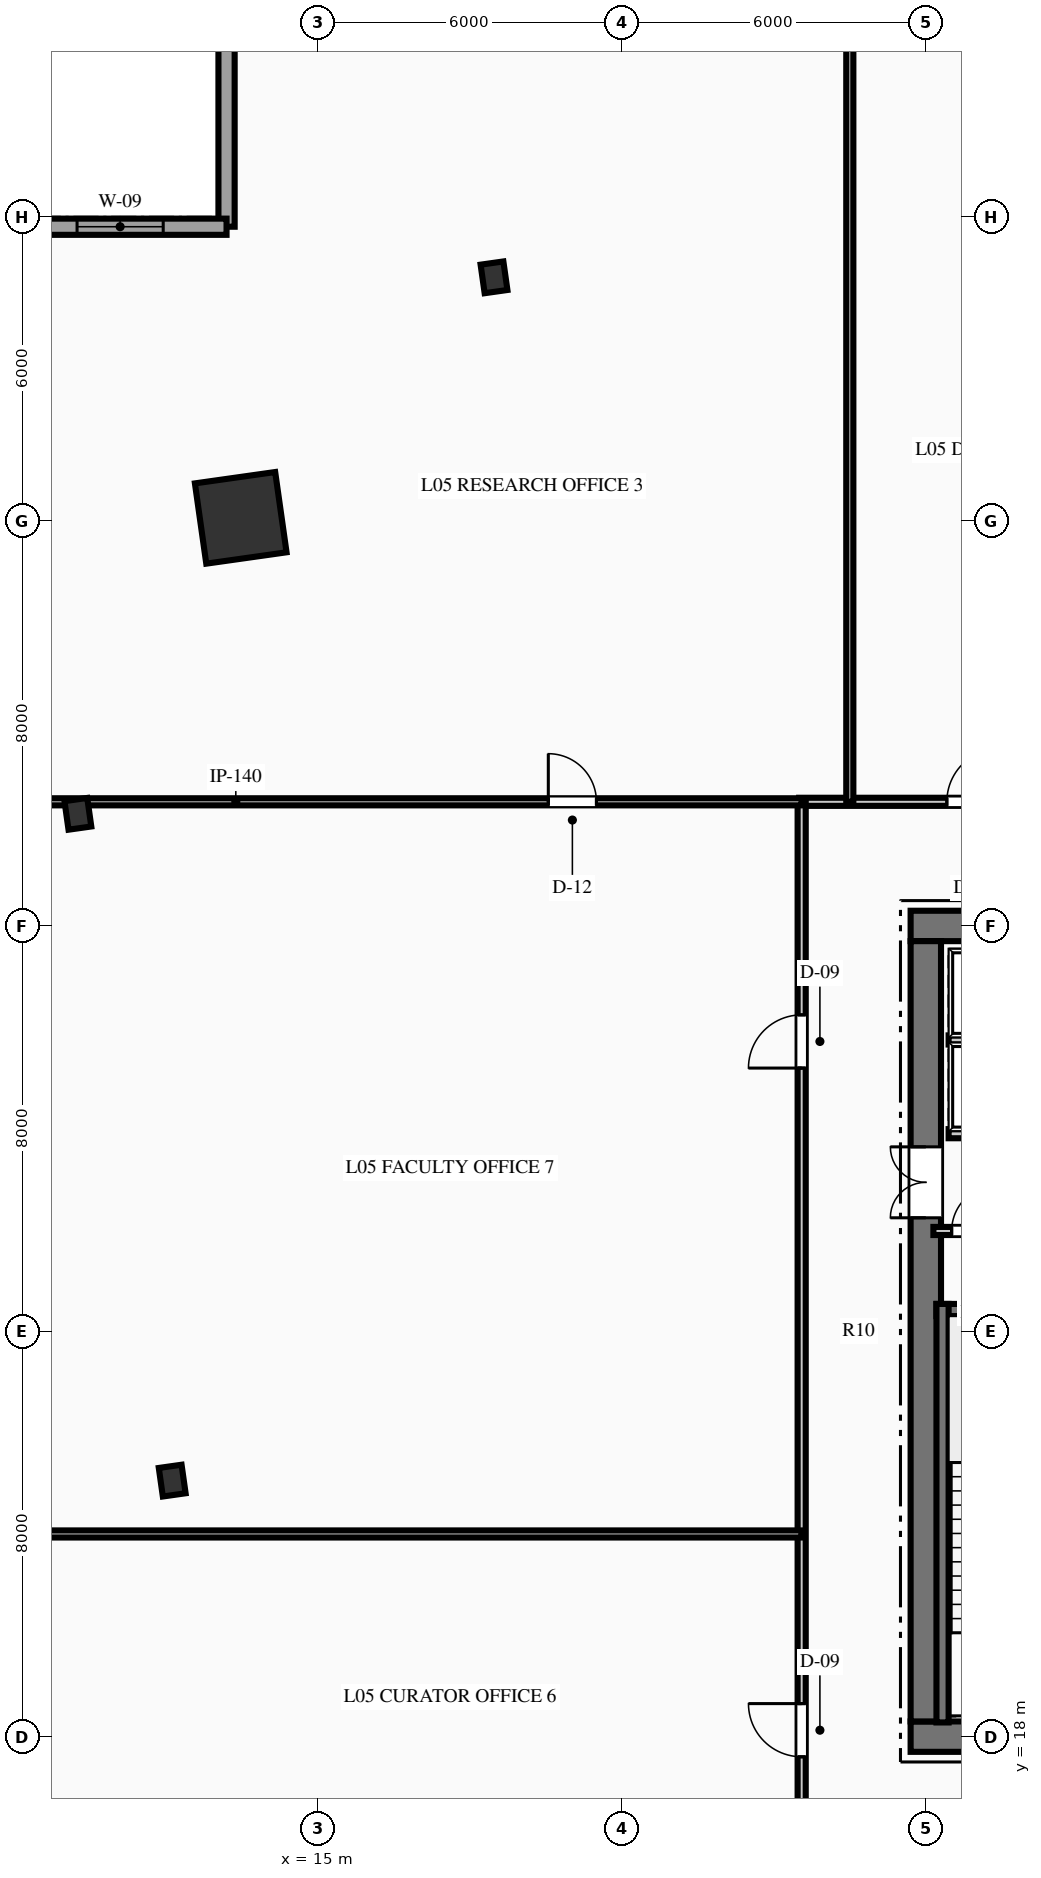
"""IFC4 building model, lengths in metres.
Left out: names, types, materials, properties, quantities, classifications, styles, units other than length and angle.
Written with IfcOpenShell. Run it as: python <this file> out.ifc"""

import sys

from ifc_helpers import new_model, si_unit, direction, frame, frame_2d, origin, origin_2d, place, context, subcontext, project, spatial, rectangle, hollow_rectangle, i_section, extrude, element, fill, save


model = new_model("IFC4")
c1 = context("Model", 3, precision=1e-05, world=origin(), true_north=direction((0.0, 1.0)))
c2 = subcontext(c1, "Body", "Model", "MODEL_VIEW")
j1 = project(units=[si_unit("LENGTHUNIT", "METRE"), si_unit("PLANEANGLEUNIT", "RADIAN")], contexts=[c1])
p1 = place(None, origin())
s1 = spatial("IfcSite", under=j1, at=p1, CompositionType="ELEMENT")
p2 = place(p1, origin())
s2 = spatial("IfcBuilding", under=s1, at=p2, CompositionType="ELEMENT")
p3 = place(p2, frame((0.0, 0.0, 28.2)))
s3 = spatial("IfcBuildingStorey", under=s2, at=p3, CompositionType="ELEMENT", Elevation=28.2)
p4 = place(p3, frame((26.7, 18.0, 0.0), z_axis=(0.0, 0.0, 1.0), x_axis=(1.0, 0.0, 0.0)))
e1 = element("IfcWall", 1, at=p4, inside=s3, PredefinedType="SHEAR", context=c2, shape_type="SweptSolid", body=[
    extrude(rectangle(XDim=18.6, YDim=0.6, at=frame_2d((9.3, 0.0))), origin(), (0.0, 0.0, 1.0), 4.5),
])
p5 = place(p4, frame((7.4, 0.0, 0.0)))
e2 = element("IfcOpeningElement", 2, at=p5, cuts=e1, PredefinedType="OPENING", context=c2, shape_type="SweptSolid", body=[
    extrude(rectangle(XDim=1.1, YDim=2.15, at=frame_2d((0.55, 1.075))), frame((0.0, 0.31, 0.0), z_axis=(0.0, -1.0, 0.0), x_axis=(1.0, 0.0, 0.0)), (0.0, 0.0, 1.0), 0.62),
])
p6 = place(p4, frame((10.1, 0.0, 0.0)))
e3 = element("IfcOpeningElement", 3, at=p6, cuts=e1, PredefinedType="OPENING", context=c2, shape_type="SweptSolid", body=[
    extrude(rectangle(XDim=1.1, YDim=2.15, at=frame_2d((0.55, 1.075))), frame((0.0, 0.31, 0.0), z_axis=(0.0, -1.0, 0.0), x_axis=(1.0, 0.0, 0.0)), (0.0, 0.0, 1.0), 0.62),
])
p7 = place(p3, frame((26.7, 34.0, 0.0), z_axis=(0.0, 0.0, 1.0), x_axis=(1.0, 0.0, 0.0)))
e4 = element("IfcWall", 4, at=p7, inside=s3, PredefinedType="SHEAR", context=c2, shape_type="SweptSolid", body=[
    extrude(rectangle(XDim=18.6, YDim=0.6, at=frame_2d((9.3, 0.0))), origin(), (0.0, 0.0, 1.0), 4.5),
])
p8 = place(p7, frame((1.265, 0.0, 0.0)))
e5 = element("IfcOpeningElement", 5, at=p8, cuts=e4, PredefinedType="OPENING", context=c2, shape_type="SweptSolid", body=[
    extrude(rectangle(XDim=1.1, YDim=2.15, at=frame_2d((0.55, 1.075))), frame((0.0, 0.31, 0.0), z_axis=(0.0, -1.0, 0.0), x_axis=(1.0, 0.0, 0.0)), (0.0, 0.0, 1.0), 0.62),
])
p9 = place(p7, frame((3.515, 0.0, 0.0)))
e6 = element("IfcOpeningElement", 6, at=p9, cuts=e4, PredefinedType="OPENING", context=c2, shape_type="SweptSolid", body=[
    extrude(rectangle(XDim=1.1, YDim=2.15, at=frame_2d((0.55, 1.075))), frame((0.0, 0.31, 0.0), z_axis=(0.0, -1.0, 0.0), x_axis=(1.0, 0.0, 0.0)), (0.0, 0.0, 1.0), 0.62),
])
p10 = place(p7, frame((13.985, 0.0, 0.0)))
e7 = element("IfcOpeningElement", 7, at=p10, cuts=e4, PredefinedType="OPENING", context=c2, shape_type="SweptSolid", body=[
    extrude(rectangle(XDim=1.1, YDim=2.15, at=frame_2d((0.55, 1.075))), frame((0.0, 0.31, 0.0), z_axis=(0.0, -1.0, 0.0), x_axis=(1.0, 0.0, 0.0)), (0.0, 0.0, 1.0), 0.62),
])
p11 = place(p7, frame((16.235, 0.0, 0.0)))
e8 = element("IfcOpeningElement", 8, at=p11, cuts=e4, PredefinedType="OPENING", context=c2, shape_type="SweptSolid", body=[
    extrude(rectangle(XDim=1.1, YDim=2.15, at=frame_2d((0.55, 1.075))), frame((0.0, 0.31, 0.0), z_axis=(0.0, -1.0, 0.0), x_axis=(1.0, 0.0, 0.0)), (0.0, 0.0, 1.0), 0.62),
])
p12 = place(p3, frame((27.0, 18.3, 0.0), z_axis=(0.0, 0.0, 1.0), x_axis=(0.0, 1.0, 0.0)))
e9 = element("IfcWall", 9, at=p12, inside=s3, PredefinedType="SHEAR", context=c2, shape_type="SweptSolid", body=[
    extrude(rectangle(XDim=15.4, YDim=0.6, at=frame_2d((7.7, 0.0))), origin(), (0.0, 0.0, 1.0), 4.5),
])
p13 = place(p12, frame((9.94, 0.0, 0.0)))
e10 = element("IfcOpeningElement", 10, at=p13, cuts=e9, PredefinedType="OPENING", context=c2, shape_type="SweptSolid", body=[
    extrude(rectangle(XDim=1.4, YDim=2.2, at=frame_2d((0.7, 1.1))), frame((0.0, 0.31, 0.0), z_axis=(0.0, -1.0, 0.0), x_axis=(1.0, 0.0, 0.0)), (0.0, 0.0, 1.0), 0.62),
])
p14 = place(p3, frame((27.21, 26.42, 0.0), z_axis=(0.0, 0.0, 1.0), x_axis=(1.0, 0.0, 0.0)))
e11 = element("IfcWall", 11, at=p14, inside=s3, PredefinedType="SHEAR", context=c2, shape_type="SweptSolid", body=[
    extrude(rectangle(XDim=3.98, YDim=0.24, at=frame_2d((1.99, 0.0))), origin(), (0.0, 0.0, 1.0), 4.5),
])
p15 = place(p3, frame((27.33, 18.28, 0.0), z_axis=(0.0, 0.0, 1.0), x_axis=(0.0, 1.0, 0.0)))
e12 = element("IfcWall", 12, at=p15, inside=s3, PredefinedType="SHEAR", context=c2, shape_type="SweptSolid", body=[
    extrude(rectangle(XDim=8.26, YDim=0.24, at=frame_2d((4.13, 0.0))), origin(), (0.0, 0.0, 1.0), 4.5),
])
p16 = place(p3, frame((13.48, 42.054, 0.0), z_axis=(0.0, 0.0, 1.0), x_axis=(0.990146240249, 0.140037219771, 0.0)))
e13 = element("IfcColumn", 13, at=p16, inside=s3, PredefinedType="COLUMN", context=c2, shape_type="SweptSolid", body=[
    extrude(hollow_rectangle(XDim=1.6, YDim=1.6, WallThickness=0.08, at=origin_2d()), origin(), (0.0, 0.0, 1.0), 4.5),
])
for number, where, z_axis, x_axis in (
    (14, (18.479, 46.801, 0.0), (0.0, 0.0, 1.0), (0.99, 0.14, 0.0)),
    (15, (10.266, 36.213, 0.0), (0.0, 0.0, 1.0), (0.99, 0.14, 0.0)),
    (16, (12.127, 23.053, 0.0), (0.0, 0.0, 1.0), (0.99, 0.14, 0.0)),
):
    element("IfcColumn", number, at=place(p3, frame(where, z_axis=z_axis, x_axis=x_axis)), inside=s3, PredefinedType="COLUMN", context=c2, shape_type="SweptSolid", body=[
        extrude(i_section(OverallWidth=0.454, OverallDepth=0.569, WebThickness=0.078, FlangeThickness=0.125, at=origin_2d()), origin(), (0.0, 0.0, 1.0), 4.5),
    ])
p17 = place(p3, frame((13.2, 47.8, 0.0), z_axis=(0.0, 0.0, 1.0), x_axis=(0.0, 1.0, 0.0)))
e17 = element("IfcWall", 17, at=p17, inside=s3, PredefinedType="STANDARD", context=c2, shape_type="SweptSolid", body=[
    extrude(rectangle(XDim=4.2, YDim=0.32, at=frame_2d((2.1, 0.0))), origin(), (0.0, 0.0, 1.0), 4.19),
])
p18 = place(p3, frame((9.0, 47.8, 0.0), z_axis=(0.0, 0.0, 1.0), x_axis=(1.0, 0.0, 0.0)))
e18 = element("IfcWall", 18, at=p18, inside=s3, PredefinedType="STANDARD", context=c2, shape_type="SweptSolid", body=[
    extrude(rectangle(XDim=4.2, YDim=0.32, at=frame_2d((2.1, 0.0))), origin(), (0.0, 0.0, 1.0), 4.19),
])
p19 = place(p18, frame((1.25, 0.0, 0.75)))
e19 = element("IfcOpeningElement", 19, at=p19, cuts=e18, PredefinedType="OPENING", context=c2, shape_type="SweptSolid", body=[
    extrude(rectangle(XDim=1.7, YDim=2.5, at=frame_2d((0.85, 1.25))), frame((0.0, 0.17, 0.0), z_axis=(0.0, -1.0, 0.0), x_axis=(1.0, 0.0, 0.0)), (0.0, 0.0, 1.0), 0.34),
])
p20 = place(p3, frame((27.15, 27.98, 0.0), z_axis=(0.0, 0.0, 1.0), x_axis=(1.0, 0.0, 0.0)))
e20 = element("IfcWall", 20, at=p20, inside=s3, PredefinedType="PARTITIONING", context=c2, shape_type="SweptSolid", body=[
    extrude(rectangle(XDim=4.05, YDim=0.16, at=frame_2d((2.025, 0.0))), origin(), (0.0, 0.0, 1.0), 4.19),
])
p21 = place(p20, frame((0.36, 0.0, 0.0)))
e21 = element("IfcOpeningElement", 21, at=p21, cuts=e20, PredefinedType="OPENING", context=c2, shape_type="SweptSolid", body=[
    extrude(rectangle(XDim=0.9, YDim=2.15, at=frame_2d((0.45, 1.075))), frame((0.0, 0.09, 0.0), z_axis=(0.0, -1.0, 0.0), x_axis=(1.0, 0.0, 0.0)), (0.0, 0.0, 1.0), 0.18),
])
p22 = place(p20, frame((1.63, 0.0, 0.0)))
e22 = element("IfcOpeningElement", 22, at=p22, cuts=e20, PredefinedType="OPENING", context=c2, shape_type="SweptSolid", body=[
    extrude(rectangle(XDim=0.9, YDim=2.15, at=frame_2d((0.45, 1.075))), frame((0.0, 0.09, 0.0), z_axis=(0.0, -1.0, 0.0), x_axis=(1.0, 0.0, 0.0)), (0.0, 0.0, 1.0), 0.18),
])
p23 = place(p20, frame((2.788, 0.0, 0.0)))
e23 = element("IfcOpeningElement", 23, at=p23, cuts=e20, PredefinedType="OPENING", context=c2, shape_type="SweptSolid", body=[
    extrude(rectangle(XDim=0.9, YDim=2.15, at=frame_2d((0.45, 1.075))), frame((0.0, 0.09, 0.0), z_axis=(0.0, -1.0, 0.0), x_axis=(1.0, 0.0, 0.0)), (0.0, 0.0, 1.0), 0.18),
])
p24 = place(p3, frame((27.45, 29.9, 0.0), z_axis=(0.0, 0.0, 1.0), x_axis=(1.0, 0.0, 0.0)))
e24 = element("IfcWall", 24, at=p24, inside=s3, PredefinedType="PARTITIONING", context=c2, shape_type="SweptSolid", body=[
    extrude(rectangle(XDim=4.43, YDim=0.18, at=frame_2d((2.215, 0.0))), origin(), (0.0, 0.0, 1.0), 4.19),
])
p25 = place(p24, frame((0.515, 0.0, 0.0)))
e25 = element("IfcOpeningElement", 25, at=p25, cuts=e24, PredefinedType="OPENING", context=c2, shape_type="SweptSolid", body=[
    extrude(rectangle(XDim=1.1, YDim=2.15, at=frame_2d((0.55, 1.075))), frame((0.0, 0.1, 0.0), z_axis=(0.0, -1.0, 0.0), x_axis=(1.0, 0.0, 0.0)), (0.0, 0.0, 1.0), 0.2),
])
p26 = place(p24, frame((2.765, 0.0, 0.0)))
e26 = element("IfcOpeningElement", 26, at=p26, cuts=e24, PredefinedType="OPENING", context=c2, shape_type="SweptSolid", body=[
    extrude(rectangle(XDim=1.1, YDim=2.15, at=frame_2d((0.55, 1.075))), frame((0.0, 0.1, 0.0), z_axis=(0.0, -1.0, 0.0), x_axis=(1.0, 0.0, 0.0)), (0.0, 0.0, 1.0), 0.2),
])
p27 = place(p3, frame((27.45, 31.75, 0.0), z_axis=(0.0, 0.0, 1.0), x_axis=(1.0, 0.0, 0.0)))
e27 = element("IfcWall", 27, at=p27, inside=s3, PredefinedType="PARTITIONING", context=c2, shape_type="SweptSolid", body=[
    extrude(rectangle(XDim=4.43, YDim=0.18, at=frame_2d((2.215, 0.0))), origin(), (0.0, 0.0, 1.0), 4.19),
])
p28 = place(p3, frame((24.5, 36.45, 0.0), z_axis=(0.0, 0.0, 1.0), x_axis=(1.0, 0.0, 0.0)))
e28 = element("IfcWall", 28, at=p28, inside=s3, PredefinedType="PARTITIONING", context=c2, shape_type="SweptSolid", body=[
    extrude(rectangle(XDim=23.0, YDim=0.16, at=frame_2d((11.5, 0.0))), origin(), (0.0, 0.0, 1.0), 4.19),
])
p29 = place(p28, frame((13.75, 0.0, 0.0)))
e29 = element("IfcOpeningElement", 29, at=p29, cuts=e28, PredefinedType="OPENING", context=c2, shape_type="SweptSolid", body=[
    extrude(rectangle(XDim=0.9, YDim=2.15, at=frame_2d((0.45, 1.075))), frame((0.0, 0.09, 0.0), z_axis=(0.0, -1.0, 0.0), x_axis=(1.0, 0.0, 0.0)), (0.0, 0.0, 1.0), 0.18),
])
p30 = place(p28, frame((16.05, 0.0, 0.0)))
e30 = element("IfcOpeningElement", 30, at=p30, cuts=e28, PredefinedType="OPENING", context=c2, shape_type="SweptSolid", body=[
    extrude(rectangle(XDim=0.9, YDim=2.15, at=frame_2d((0.45, 1.075))), frame((0.0, 0.09, 0.0), z_axis=(0.0, -1.0, 0.0), x_axis=(1.0, 0.0, 0.0)), (0.0, 0.0, 1.0), 0.18),
])
p31 = place(p28, frame((18.3, 0.0, 0.0)))
e31 = element("IfcOpeningElement", 31, at=p31, cuts=e28, PredefinedType="OPENING", context=c2, shape_type="SweptSolid", body=[
    extrude(rectangle(XDim=1.0, YDim=2.15, at=frame_2d((0.5, 1.075))), frame((0.0, 0.09, 0.0), z_axis=(0.0, -1.0, 0.0), x_axis=(1.0, 0.0, 0.0)), (0.0, 0.0, 1.0), 0.18),
])
p32 = place(p28, frame((2.915, 0.0, 0.0)))
e32 = element("IfcOpeningElement", 32, at=p32, cuts=e28, PredefinedType="OPENING", context=c2, shape_type="SweptSolid", body=[
    extrude(rectangle(XDim=1.05, YDim=2.15, at=frame_2d((0.525, 1.075))), frame((0.0, 0.09, 0.0), z_axis=(0.0, -1.0, 0.0), x_axis=(1.0, 0.0, 0.0)), (0.0, 0.0, 1.0), 0.18),
])
p33 = place(p28, frame((11.335, 0.0, 0.0)))
e33 = element("IfcOpeningElement", 33, at=p33, cuts=e28, PredefinedType="OPENING", context=c2, shape_type="SweptSolid", body=[
    extrude(rectangle(XDim=1.05, YDim=2.15, at=frame_2d((0.525, 1.075))), frame((0.0, 0.09, 0.0), z_axis=(0.0, -1.0, 0.0), x_axis=(1.0, 0.0, 0.0)), (0.0, 0.0, 1.0), 0.18),
])
p34 = place(p3, frame((24.55, 15.55, 0.0), z_axis=(0.0, 0.0, 1.0), x_axis=(0.0, 1.0, 0.0)))
e34 = element("IfcWall", 34, at=p34, inside=s3, PredefinedType="PARTITIONING", context=c2, shape_type="SweptSolid", body=[
    extrude(rectangle(XDim=20.9, YDim=0.16, at=frame_2d((10.45, 0.0))), origin(), (0.0, 0.0, 1.0), 4.19),
])
p35 = place(p34, frame((2.052, 0.0, 0.0)))
e35 = element("IfcOpeningElement", 35, at=p35, cuts=e34, PredefinedType="OPENING", context=c2, shape_type="SweptSolid", body=[
    extrude(rectangle(XDim=1.05, YDim=2.15, at=frame_2d((0.525, 1.075))), frame((0.0, 0.09, 0.0), z_axis=(0.0, -1.0, 0.0), x_axis=(1.0, 0.0, 0.0)), (0.0, 0.0, 1.0), 0.18),
])
p36 = place(p34, frame((15.645, 0.0, 0.0)))
e36 = element("IfcOpeningElement", 36, at=p36, cuts=e34, PredefinedType="OPENING", context=c2, shape_type="SweptSolid", body=[
    extrude(rectangle(XDim=1.05, YDim=2.15, at=frame_2d((0.525, 1.075))), frame((0.0, 0.09, 0.0), z_axis=(0.0, -1.0, 0.0), x_axis=(1.0, 0.0, 0.0)), (0.0, 0.0, 1.0), 0.18),
])
p37 = place(p3, frame((9.04, 36.45, 0.0), z_axis=(0.0, 0.0, 1.0), x_axis=(1.0, 0.0, 0.0)))
e37 = element("IfcWall", 37, at=p37, inside=s3, PredefinedType="PARTITIONING", context=c2, shape_type="SweptSolid", body=[
    extrude(rectangle(XDim=15.51, YDim=0.14, at=frame_2d((7.755, 0.0))), origin(), (0.0, 0.0, 1.0), 3.489),
])
p38 = place(p37, frame((10.51, 0.0, 0.0)))
e38 = element("IfcOpeningElement", 38, at=p38, cuts=e37, PredefinedType="OPENING", context=c2, shape_type="SweptSolid", body=[
    extrude(rectangle(XDim=0.95, YDim=2.15, at=frame_2d((0.475, 1.075))), frame((0.0, 0.08, 0.0), z_axis=(0.0, -1.0, 0.0), x_axis=(1.0, 0.0, 0.0)), (0.0, 0.0, 1.0), 0.16),
])
for number, where, z_axis, x_axis in (
    (39, (25.5, 36.45, 0.0), (0.0, 0.0, 1.0), (0.0, 1.0, 0.0)),
    (40, (9.04, 22.0, 0.0), (0.0, 0.0, 1.0), (1.0, 0.0, 0.0)),
):
    element("IfcWall", number, at=place(p3, frame(where, z_axis=z_axis, x_axis=x_axis)), inside=s3, PredefinedType="PARTITIONING", context=c2, shape_type="SweptSolid", body=[
        extrude(rectangle(XDim=15.51, YDim=0.14, at=frame_2d((7.755, 0.0))), origin(), (0.0, 0.0, 1.0), 4.19),
    ])
p39 = place(p19, origin())
e41 = element("IfcWindow", 41, at=p39, inside=s3, PartitioningType="SINGLE_PANEL", PredefinedType="WINDOW", context=c2, shape_type="SweptSolid", body=[
    extrude(rectangle(XDim=1.7, YDim=2.5, at=frame_2d((0.85, 1.25))), frame((0.0, 0.03, 0.0), z_axis=(0.0, -1.0, 0.0), x_axis=(1.0, 0.0, 0.0)), (0.0, 0.0, 1.0), 0.06),
])
fill(e19, e41)
p40 = place(p21, origin())
e42 = element("IfcDoor", 42, at=p40, inside=s3, OperationType="SINGLE_SWING_RIGHT", PredefinedType="DOOR", context=c2, shape_type="SweptSolid", body=[
    extrude(rectangle(XDim=0.9, YDim=2.15, at=frame_2d((0.45, 1.075))), frame((0.0, 0.025, 0.0), z_axis=(0.0, -1.0, 0.0), x_axis=(1.0, 0.0, 0.0)), (0.0, 0.0, 1.0), 0.05),
])
fill(e21, e42)
p41 = place(p13, origin())
e43 = element("IfcDoor", 43, at=p41, inside=s3, OperationType="DOUBLE_DOOR_SINGLE_SWING", PredefinedType="DOOR", context=c2, shape_type="SweptSolid", body=[
    extrude(rectangle(XDim=1.4, YDim=2.2, at=frame_2d((0.7, 1.1))), frame((0.0, 0.025, 0.0), z_axis=(0.0, -1.0, 0.0), x_axis=(1.0, 0.0, 0.0)), (0.0, 0.0, 1.0), 0.05),
])
fill(e10, e43)
p42 = place(p38, origin())
e44 = element("IfcDoor", 44, at=p42, inside=s3, OperationType="SINGLE_SWING_LEFT", PredefinedType="DOOR", context=c2, shape_type="SweptSolid", body=[
    extrude(rectangle(XDim=0.95, YDim=2.15, at=frame_2d((0.475, 1.075))), frame((0.0, 0.025, 0.0), z_axis=(0.0, -1.0, 0.0), x_axis=(1.0, 0.0, 0.0)), (0.0, 0.0, 1.0), 0.05),
])
fill(e38, e44)
p43 = place(p32, origin())
e45 = element("IfcDoor", 45, at=p43, inside=s3, OperationType="SINGLE_SWING_RIGHT", PredefinedType="DOOR", context=c2, shape_type="SweptSolid", body=[
    extrude(rectangle(XDim=1.05, YDim=2.15, at=frame_2d((0.525, 1.075))), frame((0.0, 0.025, 0.0), z_axis=(0.0, -1.0, 0.0), x_axis=(1.0, 0.0, 0.0)), (0.0, 0.0, 1.0), 0.05),
])
fill(e32, e45)
p44 = place(p35, origin())
e46 = element("IfcDoor", 46, at=p44, inside=s3, OperationType="SINGLE_SWING_RIGHT", PredefinedType="DOOR", context=c2, shape_type="SweptSolid", body=[
    extrude(rectangle(XDim=1.05, YDim=2.15, at=frame_2d((0.525, 1.075))), frame((0.0, 0.025, 0.0), z_axis=(0.0, -1.0, 0.0), x_axis=(1.0, 0.0, 0.0)), (0.0, 0.0, 1.0), 0.05),
])
fill(e35, e46)
p45 = place(p36, origin())
e47 = element("IfcDoor", 47, at=p45, inside=s3, OperationType="SINGLE_SWING_LEFT", PredefinedType="DOOR", context=c2, shape_type="SweptSolid", body=[
    extrude(rectangle(XDim=1.05, YDim=2.15, at=frame_2d((0.525, 1.075))), frame((0.0, 0.025, 0.0), z_axis=(0.0, -1.0, 0.0), x_axis=(1.0, 0.0, 0.0)), (0.0, 0.0, 1.0), 0.05),
])
fill(e36, e47)
save(model, sys.argv[1])
